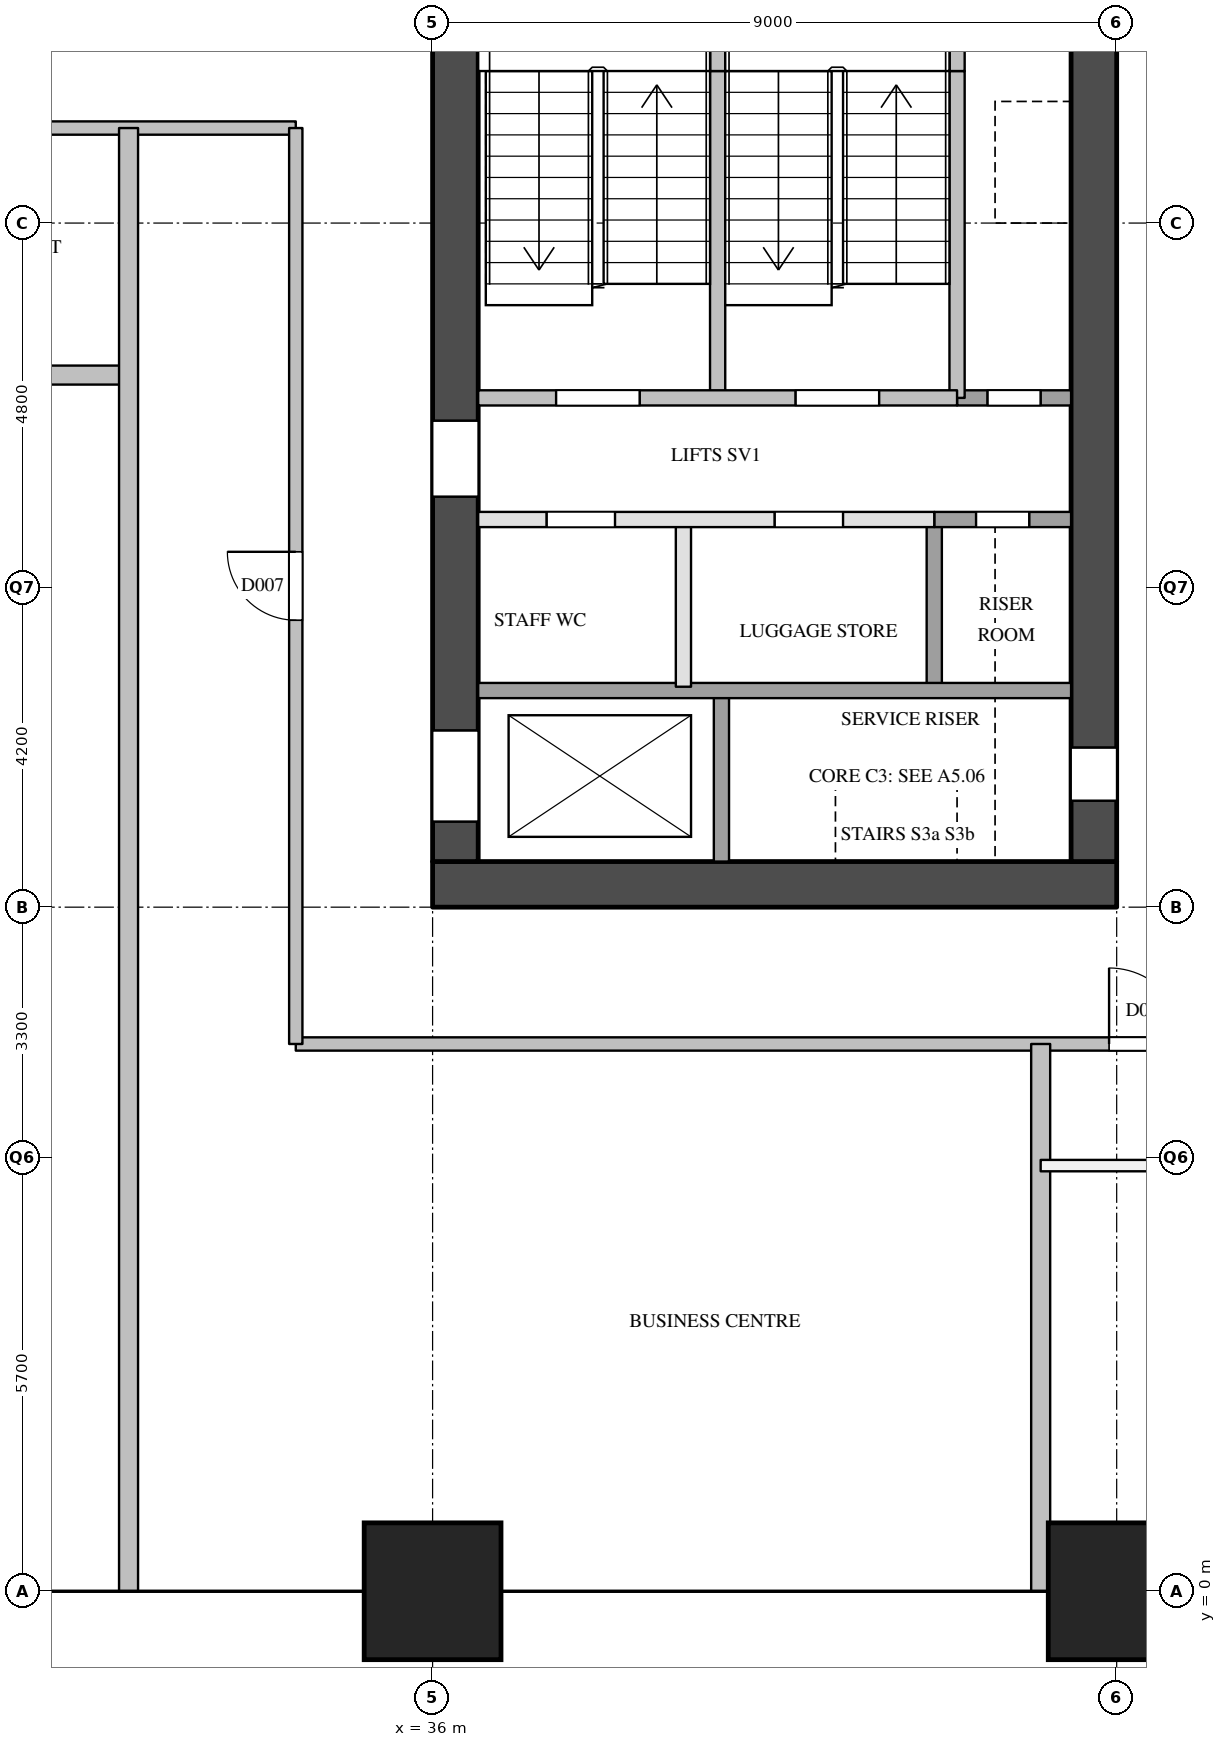
"""IFC4 building model, lengths in metres.
Left out: names, types, materials, properties, quantities, classifications, styles, units other than length and angle.
Written with IfcOpenShell. Run it as: python <this file> out.ifc"""

import sys

from ifc_helpers import new_model, si_unit, direction, frame, frame_2d, origin, origin_2d, place, context, subcontext, project, spatial, rectangle, extrude, element, fill, save


model = new_model("IFC4")
c1 = context("Model", 3, precision=1e-05, world=origin(), true_north=direction((0.0, 1.0)))
c2 = subcontext(c1, "Body", "Model", "MODEL_VIEW")
j1 = project(units=[si_unit("LENGTHUNIT", "METRE"), si_unit("PLANEANGLEUNIT", "RADIAN")], contexts=[c1])
p1 = place(None, origin())
s1 = spatial("IfcSite", under=j1, at=p1, CompositionType="ELEMENT")
p2 = place(p1, origin())
s2 = spatial("IfcBuilding", under=s1, at=p2, CompositionType="ELEMENT")
p3 = place(p2, frame((0.0, 0.0, 34.8)))
s3 = spatial("IfcBuildingStorey", under=s2, at=p3, CompositionType="ELEMENT", Elevation=34.8)
for number, where, z_axis, x_axis in (
    (1, (36.0, 0.0, 0.0), (0.0, 0.0, 1.0), (1.0, 0.0, 0.0)),
    (2, (45.0, 0.0, 0.0), (0.0, 0.0, 1.0), (1.0, 0.0, 0.0)),
):
    element("IfcColumn", number, at=place(p3, frame(where, z_axis=z_axis, x_axis=x_axis)), inside=s3, PredefinedType="COLUMN", context=c2, shape_type="SweptSolid", body=[
        extrude(rectangle(XDim=1.8, YDim=1.8, at=origin_2d()), origin(), (0.0, 0.0, 1.0), 3.8),
    ])
p4 = place(p3, frame((36.0, 9.3, 0.0), z_axis=(0.0, 0.0, 1.0), x_axis=(1.0, 0.0, 0.0)))
e3 = element("IfcWall", 3, at=p4, inside=s3, PredefinedType="SHEAR", context=c2, shape_type="SweptSolid", body=[
    extrude(rectangle(XDim=9.0, YDim=0.6, at=frame_2d((4.5, 0.0))), origin(), (0.0, 0.0, 1.0), 3.5),
])
p5 = place(p3, frame((36.3, 9.6, 0.0), z_axis=(0.0, 0.0, 1.0), x_axis=(0.0, 1.0, 0.0)))
e4 = element("IfcWall", 4, at=p5, inside=s3, PredefinedType="SHEAR", context=c2, shape_type="SweptSolid", body=[
    extrude(rectangle(XDim=12.3, YDim=0.6, at=frame_2d((6.15, 0.0))), origin(), (0.0, 0.0, 1.0), 3.5),
])
p6 = place(p5, frame((0.525, 0.0, 0.0)))
e5 = element("IfcOpeningElement", 5, at=p6, cuts=e4, PredefinedType="OPENING", context=c2, shape_type="SweptSolid", body=[
    extrude(rectangle(XDim=1.2, YDim=2.1, at=frame_2d((0.6, 1.05))), frame((0.0, 0.31, 0.0), z_axis=(0.0, -1.0, 0.0), x_axis=(1.0, 0.0, 0.0)), (0.0, 0.0, 1.0), 0.62),
])
p7 = place(p5, frame((4.8, 0.0, 0.0)))
e6 = element("IfcOpeningElement", 6, at=p7, cuts=e4, PredefinedType="OPENING", context=c2, shape_type="SweptSolid", body=[
    extrude(rectangle(XDim=1.0, YDim=2.1, at=frame_2d((0.5, 1.05))), frame((0.0, 0.31, 0.0), z_axis=(0.0, -1.0, 0.0), x_axis=(1.0, 0.0, 0.0)), (0.0, 0.0, 1.0), 0.62),
])
p8 = place(p3, frame((44.7, 9.6, 0.0), z_axis=(0.0, 0.0, 1.0), x_axis=(0.0, 1.0, 0.0)))
e7 = element("IfcWall", 7, at=p8, inside=s3, PredefinedType="SHEAR", context=c2, shape_type="SweptSolid", body=[
    extrude(rectangle(XDim=12.3, YDim=0.6, at=frame_2d((6.15, 0.0))), origin(), (0.0, 0.0, 1.0), 3.5),
])
p9 = place(p8, frame((0.8, 0.0, 0.0)))
e8 = element("IfcOpeningElement", 8, at=p9, cuts=e7, PredefinedType="OPENING", context=c2, shape_type="SweptSolid", body=[
    extrude(rectangle(XDim=0.7, YDim=2.1, at=frame_2d((0.35, 1.05))), frame((0.0, 0.31, 0.0), z_axis=(0.0, -1.0, 0.0), x_axis=(1.0, 0.0, 0.0)), (0.0, 0.0, 1.0), 0.62),
])
p10 = place(p3, frame((39.3, 11.9, 0.0), z_axis=(0.0, 0.0, 1.0), x_axis=(0.0, 1.0, 0.0)))
e9 = element("IfcWall", 9, at=p10, inside=s3, PredefinedType="PARTITIONING", context=c2, shape_type="SweptSolid", body=[
    extrude(rectangle(XDim=2.2, YDim=0.2, at=frame_2d((1.1, 0.0))), origin(), (0.0, 0.0, 1.0), 3.5),
])
p11 = place(p3, frame((39.75, 15.7, 0.0), z_axis=(0.0, 0.0, 1.0), x_axis=(0.0, 1.0, 0.0)))
e10 = element("IfcWall", 10, at=p11, inside=s3, PredefinedType="SOLIDWALL", context=c2, shape_type="SweptSolid", body=[
    extrude(rectangle(XDim=4.3, YDim=0.2, at=frame_2d((2.15, 0.0))), origin(), (0.0, 0.0, 1.0), 3.5),
])
p12 = place(p3, frame((39.75, 20.0, 0.0), z_axis=(0.0, 0.0, 1.0), x_axis=(0.0, 1.0, 0.0)))
e11 = element("IfcWall", 11, at=p12, inside=s3, PredefinedType="SOLIDWALL", context=c2, shape_type="SweptSolid", body=[
    extrude(rectangle(XDim=1.9, YDim=0.2, at=frame_2d((0.95, 0.0))), origin(), (0.0, 0.0, 1.0), 3.5),
])
p13 = place(p3, frame((39.8, 9.6, 0.0), z_axis=(0.0, 0.0, 1.0), x_axis=(0.0, 1.0, 0.0)))
e12 = element("IfcWall", 12, at=p13, inside=s3, PredefinedType="SOLIDWALL", context=c2, shape_type="SweptSolid", body=[
    extrude(rectangle(XDim=2.3, YDim=0.2, at=frame_2d((1.15, 0.0))), origin(), (0.0, 0.0, 1.0), 3.5),
])
p14 = place(p3, frame((42.6, 11.9, 0.0), z_axis=(0.0, 0.0, 1.0), x_axis=(0.0, 1.0, 0.0)))
e13 = element("IfcWall", 13, at=p14, inside=s3, PredefinedType="SOLIDWALL", context=c2, shape_type="SweptSolid", body=[
    extrude(rectangle(XDim=2.2, YDim=0.2, at=frame_2d((1.1, 0.0))), origin(), (0.0, 0.0, 1.0), 3.5),
])
p15 = place(p3, frame((42.9, 15.7, 0.0), z_axis=(0.0, 0.0, 1.0), x_axis=(0.0, 1.0, 0.0)))
e14 = element("IfcWall", 14, at=p15, inside=s3, PredefinedType="SOLIDWALL", context=c2, shape_type="SweptSolid", body=[
    extrude(rectangle(XDim=4.3, YDim=0.2, at=frame_2d((2.15, 0.0))), origin(), (0.0, 0.0, 1.0), 3.5),
])
p16 = place(p3, frame((42.9, 20.0, 0.0), z_axis=(0.0, 0.0, 1.0), x_axis=(0.0, 1.0, 0.0)))
e15 = element("IfcWall", 15, at=p16, inside=s3, PredefinedType="SOLIDWALL", context=c2, shape_type="SweptSolid", body=[
    extrude(rectangle(XDim=1.9, YDim=0.2, at=frame_2d((0.95, 0.0))), origin(), (0.0, 0.0, 1.0), 3.5),
])
p17 = place(p3, frame((36.6, 11.85, 0.0), z_axis=(0.0, 0.0, 1.0), x_axis=(1.0, 0.0, 0.0)))
e16 = element("IfcWall", 16, at=p17, inside=s3, PredefinedType="SOLIDWALL", context=c2, shape_type="SweptSolid", body=[
    extrude(rectangle(XDim=7.8, YDim=0.2, at=frame_2d((3.9, 0.0))), origin(), (0.0, 0.0, 1.0), 3.5),
])
p18 = place(p3, frame((36.6, 14.1, 0.0), z_axis=(0.0, 0.0, 1.0), x_axis=(1.0, 0.0, 0.0)))
e17 = element("IfcWall", 17, at=p18, inside=s3, PredefinedType="PARTITIONING", context=c2, shape_type="SweptSolid", body=[
    extrude(rectangle(XDim=6.0, YDim=0.2, at=frame_2d((3.0, 0.0))), origin(), (0.0, 0.0, 1.0), 3.5),
])
p19 = place(p18, frame((0.9, 0.0, 0.0)))
e18 = element("IfcOpeningElement", 18, at=p19, cuts=e17, PredefinedType="OPENING", context=c2, shape_type="SweptSolid", body=[
    extrude(rectangle(XDim=0.9, YDim=2.1, at=frame_2d((0.45, 1.05))), frame((0.0, 0.11, 0.0), z_axis=(0.0, -1.0, 0.0), x_axis=(1.0, 0.0, 0.0)), (0.0, 0.0, 1.0), 0.22),
])
p20 = place(p18, frame((3.9, 0.0, 0.0)))
e19 = element("IfcOpeningElement", 19, at=p20, cuts=e17, PredefinedType="OPENING", context=c2, shape_type="SweptSolid", body=[
    extrude(rectangle(XDim=0.9, YDim=2.1, at=frame_2d((0.45, 1.05))), frame((0.0, 0.11, 0.0), z_axis=(0.0, -1.0, 0.0), x_axis=(1.0, 0.0, 0.0)), (0.0, 0.0, 1.0), 0.22),
])
p21 = place(p3, frame((42.6, 14.1, 0.0), z_axis=(0.0, 0.0, 1.0), x_axis=(1.0, 0.0, 0.0)))
e20 = element("IfcWall", 20, at=p21, inside=s3, PredefinedType="SOLIDWALL", context=c2, shape_type="SweptSolid", body=[
    extrude(rectangle(XDim=1.8, YDim=0.2, at=frame_2d((0.9, 0.0))), origin(), (0.0, 0.0, 1.0), 3.5),
])
p22 = place(p21, frame((0.55, 0.0, 0.0)))
e21 = element("IfcOpeningElement", 21, at=p22, cuts=e20, PredefinedType="OPENING", context=c2, shape_type="SweptSolid", body=[
    extrude(rectangle(XDim=0.7, YDim=2.1, at=frame_2d((0.35, 1.05))), frame((0.0, 0.11, 0.0), z_axis=(0.0, -1.0, 0.0), x_axis=(1.0, 0.0, 0.0)), (0.0, 0.0, 1.0), 0.22),
])
p23 = place(p3, frame((42.9, 15.7, 0.0), z_axis=(0.0, 0.0, 1.0), x_axis=(1.0, 0.0, 0.0)))
e22 = element("IfcWall", 22, at=p23, inside=s3, PredefinedType="SOLIDWALL", context=c2, shape_type="SweptSolid", body=[
    extrude(rectangle(XDim=1.5, YDim=0.2, at=frame_2d((0.75, 0.0))), origin(), (0.0, 0.0, 1.0), 3.5),
])
p24 = place(p23, frame((0.4, 0.0, 0.0)))
e23 = element("IfcOpeningElement", 23, at=p24, cuts=e22, PredefinedType="OPENING", context=c2, shape_type="SweptSolid", body=[
    extrude(rectangle(XDim=0.7, YDim=2.1, at=frame_2d((0.35, 1.05))), frame((0.0, 0.11, 0.0), z_axis=(0.0, -1.0, 0.0), x_axis=(1.0, 0.0, 0.0)), (0.0, 0.0, 1.0), 0.22),
])
p25 = place(p3, frame((36.6, 15.7, 0.0), z_axis=(0.0, 0.0, 1.0), x_axis=(1.0, 0.0, 0.0)))
e24 = element("IfcWall", 24, at=p25, inside=s3, PredefinedType="SOLIDWALL", context=c2, shape_type="SweptSolid", body=[
    extrude(rectangle(XDim=6.3, YDim=0.2, at=frame_2d((3.15, 0.0))), origin(), (0.0, 0.0, 1.0), 3.5),
])
p26 = place(p25, frame((1.025, 0.0, 0.0)))
e25 = element("IfcOpeningElement", 25, at=p26, cuts=e24, PredefinedType="OPENING", context=c2, shape_type="SweptSolid", body=[
    extrude(rectangle(XDim=1.1, YDim=2.1, at=frame_2d((0.55, 1.05))), frame((0.0, 0.11, 0.0), z_axis=(0.0, -1.0, 0.0), x_axis=(1.0, 0.0, 0.0)), (0.0, 0.0, 1.0), 0.22),
])
p27 = place(p25, frame((4.175, 0.0, 0.0)))
e26 = element("IfcOpeningElement", 26, at=p27, cuts=e24, PredefinedType="OPENING", context=c2, shape_type="SweptSolid", body=[
    extrude(rectangle(XDim=1.1, YDim=2.1, at=frame_2d((0.55, 1.05))), frame((0.0, 0.11, 0.0), z_axis=(0.0, -1.0, 0.0), x_axis=(1.0, 0.0, 0.0)), (0.0, 0.0, 1.0), 0.22),
])
p28 = place(p3, frame((34.2, 7.2, 0.0), z_axis=(0.0, 0.0, 1.0), x_axis=(1.0, 0.0, 0.0)))
e27 = element("IfcWall", 27, at=p28, inside=s3, PredefinedType="PARTITIONING", context=c2, shape_type="SweptSolid", body=[
    extrude(rectangle(XDim=12.6, YDim=0.175, at=frame_2d((6.3, 0.0))), origin(), (0.0, 0.0, 1.0), 3.5),
])
p29 = place(p28, frame((10.7, 0.0, 0.0)))
e28 = element("IfcOpeningElement", 28, at=p29, cuts=e27, PredefinedType="OPENING", context=c2, shape_type="SweptSolid", body=[
    extrude(rectangle(XDim=1.0, YDim=2.1, at=frame_2d((0.5, 1.05))), frame((0.0, 0.097, 0.0), z_axis=(0.0, -1.0, 0.0), x_axis=(1.0, 0.0, 0.0)), (0.0, 0.0, 1.0), 0.195),
])
p30 = place(p3, frame((19.8, 19.25, 0.0), z_axis=(0.0, 0.0, 1.0), x_axis=(1.0, 0.0, 0.0)))
e29 = element("IfcWall", 29, at=p30, inside=s3, PredefinedType="PARTITIONING", context=c2, shape_type="SweptSolid", body=[
    extrude(rectangle(XDim=14.4, YDim=0.175, at=frame_2d((7.2, 0.0))), origin(), (0.0, 0.0, 1.0), 2.5),
])
p31 = place(p30, frame((3.44, 0.0, 0.0)))
e30 = element("IfcOpeningElement", 30, at=p31, cuts=e29, PredefinedType="OPENING", context=c2, shape_type="SweptSolid", body=[
    extrude(rectangle(XDim=1.0, YDim=2.1, at=frame_2d((0.5, 1.05))), frame((0.0, 0.097, 0.0), z_axis=(0.0, -1.0, 0.0), x_axis=(1.0, 0.0, 0.0)), (0.0, 0.0, 1.0), 0.195),
])
p32 = place(p3, frame((34.2, 7.2, 0.0), z_axis=(0.0, 0.0, 1.0), x_axis=(0.0, 1.0, 0.0)))
e31 = element("IfcWall", 31, at=p32, inside=s3, PredefinedType="PARTITIONING", context=c2, shape_type="SweptSolid", body=[
    extrude(rectangle(XDim=12.05, YDim=0.175, at=frame_2d((6.025, 0.0))), origin(), (0.0, 0.0, 1.0), 3.5),
])
p33 = place(p32, frame((5.575, 0.0, 0.0)))
e32 = element("IfcOpeningElement", 32, at=p33, cuts=e31, PredefinedType="OPENING", context=c2, shape_type="SweptSolid", body=[
    extrude(rectangle(XDim=0.9, YDim=2.1, at=frame_2d((0.45, 1.05))), frame((0.0, 0.097, 0.0), z_axis=(0.0, -1.0, 0.0), x_axis=(1.0, 0.0, 0.0)), (0.0, 0.0, 1.0), 0.195),
])
p34 = place(p3, frame((44.0, 5.6, 0.0), z_axis=(0.0, 0.0, 1.0), x_axis=(1.0, 0.0, 0.0)))
e33 = element("IfcWall", 33, at=p34, inside=s3, PredefinedType="PARTITIONING", context=c2, shape_type="SweptSolid", body=[
    extrude(rectangle(XDim=7.6, YDim=0.15, at=frame_2d((3.8, 0.0))), origin(), (0.0, 0.0, 1.0), 3.5),
])
p35 = place(p34, frame((3.35, 0.0, 0.0)))
e34 = element("IfcOpeningElement", 34, at=p35, cuts=e33, PredefinedType="OPENING", context=c2, shape_type="SweptSolid", body=[
    extrude(rectangle(XDim=0.9, YDim=2.1, at=frame_2d((0.45, 1.05))), frame((0.0, 0.085, 0.0), z_axis=(0.0, -1.0, 0.0), x_axis=(1.0, 0.0, 0.0)), (0.0, 0.0, 1.0), 0.17),
])
p36 = place(p3, frame((19.8, 16.0, 0.0), z_axis=(0.0, 0.0, 1.0), x_axis=(1.0, 0.0, 0.0)))
e35 = element("IfcWall", 35, at=p36, inside=s3, PredefinedType="PARTITIONING", context=c2, shape_type="SweptSolid", body=[
    extrude(rectangle(XDim=12.2, YDim=0.25, at=frame_2d((6.1, 0.0))), origin(), (0.0, 0.0, 1.0), 2.5),
])
p37 = place(p3, frame((32.0, 0.0, 0.0), z_axis=(0.0, 0.0, 1.0), x_axis=(0.0, 1.0, 0.0)))
e36 = element("IfcWall", 36, at=p37, inside=s3, PredefinedType="PARTITIONING", context=c2, shape_type="SweptSolid", body=[
    extrude(rectangle(XDim=19.25, YDim=0.25, at=frame_2d((9.625, 0.0))), origin(), (0.0, 0.0, 1.0), 2.5),
])
p38 = place(p3, frame((44.0, 0.0, 0.0), z_axis=(0.0, 0.0, 1.0), x_axis=(0.0, 1.0, 0.0)))
e37 = element("IfcWall", 37, at=p38, inside=s3, PredefinedType="PARTITIONING", context=c2, shape_type="SweptSolid", body=[
    extrude(rectangle(XDim=7.2, YDim=0.25, at=frame_2d((3.6, 0.0))), origin(), (0.0, 0.0, 1.0), 2.5),
])
p39 = place(p6, origin())
e38 = element("IfcDoor", 38, at=p39, inside=s3, OperationType="SLIDING_TO_LEFT", PredefinedType="DOOR", context=c2, shape_type="SweptSolid", body=[
    extrude(rectangle(XDim=1.2, YDim=2.1, at=frame_2d((0.6, 1.05))), frame((0.0, 0.025, 0.0), z_axis=(0.0, -1.0, 0.0), x_axis=(1.0, 0.0, 0.0)), (0.0, 0.0, 1.0), 0.05),
])
fill(e5, e38)
p40 = place(p26, origin())
e39 = element("IfcDoor", 39, at=p40, inside=s3, OperationType="SINGLE_SWING_LEFT", PredefinedType="DOOR", context=c2, shape_type="SweptSolid", body=[
    extrude(rectangle(XDim=1.1, YDim=2.1, at=frame_2d((0.55, 1.05))), frame((0.0, 0.025, 0.0), z_axis=(0.0, -1.0, 0.0), x_axis=(1.0, 0.0, 0.0)), (0.0, 0.0, 1.0), 0.05),
])
fill(e25, e39)
p41 = place(p27, origin())
e40 = element("IfcDoor", 40, at=p41, inside=s3, OperationType="SINGLE_SWING_RIGHT", PredefinedType="DOOR", context=c2, shape_type="SweptSolid", body=[
    extrude(rectangle(XDim=1.1, YDim=2.1, at=frame_2d((0.55, 1.05))), frame((0.0, 0.025, 0.0), z_axis=(0.0, -1.0, 0.0), x_axis=(1.0, 0.0, 0.0)), (0.0, 0.0, 1.0), 0.05),
])
fill(e26, e40)
p42 = place(p24, origin())
e41 = element("IfcDoor", 41, at=p42, inside=s3, OperationType="SINGLE_SWING_LEFT", PredefinedType="DOOR", context=c2, shape_type="SweptSolid", body=[
    extrude(rectangle(XDim=0.7, YDim=2.1, at=frame_2d((0.35, 1.05))), frame((0.0, 0.025, 0.0), z_axis=(0.0, -1.0, 0.0), x_axis=(1.0, 0.0, 0.0)), (0.0, 0.0, 1.0), 0.05),
])
fill(e23, e41)
p43 = place(p22, origin())
e42 = element("IfcDoor", 42, at=p43, inside=s3, OperationType="SINGLE_SWING_RIGHT", PredefinedType="DOOR", context=c2, shape_type="SweptSolid", body=[
    extrude(rectangle(XDim=0.7, YDim=2.1, at=frame_2d((0.35, 1.05))), frame((0.0, 0.025, 0.0), z_axis=(0.0, -1.0, 0.0), x_axis=(1.0, 0.0, 0.0)), (0.0, 0.0, 1.0), 0.05),
])
fill(e21, e42)
p44 = place(p9, origin())
e43 = element("IfcDoor", 43, at=p44, inside=s3, OperationType="SINGLE_SWING_LEFT", PredefinedType="DOOR", context=c2, shape_type="SweptSolid", body=[
    extrude(rectangle(XDim=0.7, YDim=2.1, at=frame_2d((0.35, 1.05))), frame((0.0, 0.025, 0.0), z_axis=(0.0, -1.0, 0.0), x_axis=(1.0, 0.0, 0.0)), (0.0, 0.0, 1.0), 0.05),
])
fill(e8, e43)
p45 = place(p7, origin())
e44 = element("IfcDoor", 44, at=p45, inside=s3, OperationType="SINGLE_SWING_LEFT", PredefinedType="DOOR", context=c2, shape_type="SweptSolid", body=[
    extrude(rectangle(XDim=1.0, YDim=2.1, at=frame_2d((0.5, 1.05))), frame((0.0, 0.025, 0.0), z_axis=(0.0, -1.0, 0.0), x_axis=(1.0, 0.0, 0.0)), (0.0, 0.0, 1.0), 0.05),
])
fill(e6, e44)
p46 = place(p19, origin())
e45 = element("IfcDoor", 45, at=p46, inside=s3, OperationType="SINGLE_SWING_LEFT", PredefinedType="DOOR", context=c2, shape_type="SweptSolid", body=[
    extrude(rectangle(XDim=0.9, YDim=2.1, at=frame_2d((0.45, 1.05))), frame((0.0, 0.025, 0.0), z_axis=(0.0, -1.0, 0.0), x_axis=(1.0, 0.0, 0.0)), (0.0, 0.0, 1.0), 0.05),
])
fill(e18, e45)
p47 = place(p20, origin())
e46 = element("IfcDoor", 46, at=p47, inside=s3, OperationType="SINGLE_SWING_RIGHT", PredefinedType="DOOR", context=c2, shape_type="SweptSolid", body=[
    extrude(rectangle(XDim=0.9, YDim=2.1, at=frame_2d((0.45, 1.05))), frame((0.0, 0.025, 0.0), z_axis=(0.0, -1.0, 0.0), x_axis=(1.0, 0.0, 0.0)), (0.0, 0.0, 1.0), 0.05),
])
fill(e19, e46)
p48 = place(p29, origin())
e47 = element("IfcDoor", 47, at=p48, inside=s3, OperationType="SINGLE_SWING_LEFT", PredefinedType="DOOR", context=c2, shape_type="SweptSolid", body=[
    extrude(rectangle(XDim=1.0, YDim=2.1, at=frame_2d((0.5, 1.05))), frame((0.0, 0.025, 0.0), z_axis=(0.0, -1.0, 0.0), x_axis=(1.0, 0.0, 0.0)), (0.0, 0.0, 1.0), 0.05),
])
fill(e28, e47)
p49 = place(p33, origin())
e48 = element("IfcDoor", 48, at=p49, inside=s3, OperationType="SINGLE_SWING_RIGHT", PredefinedType="DOOR", context=c2, shape_type="SweptSolid", body=[
    extrude(rectangle(XDim=0.9, YDim=2.1, at=frame_2d((0.45, 1.05))), frame((0.0, 0.025, 0.0), z_axis=(0.0, -1.0, 0.0), x_axis=(1.0, 0.0, 0.0)), (0.0, 0.0, 1.0), 0.05),
])
fill(e32, e48)
save(model, sys.argv[1])
